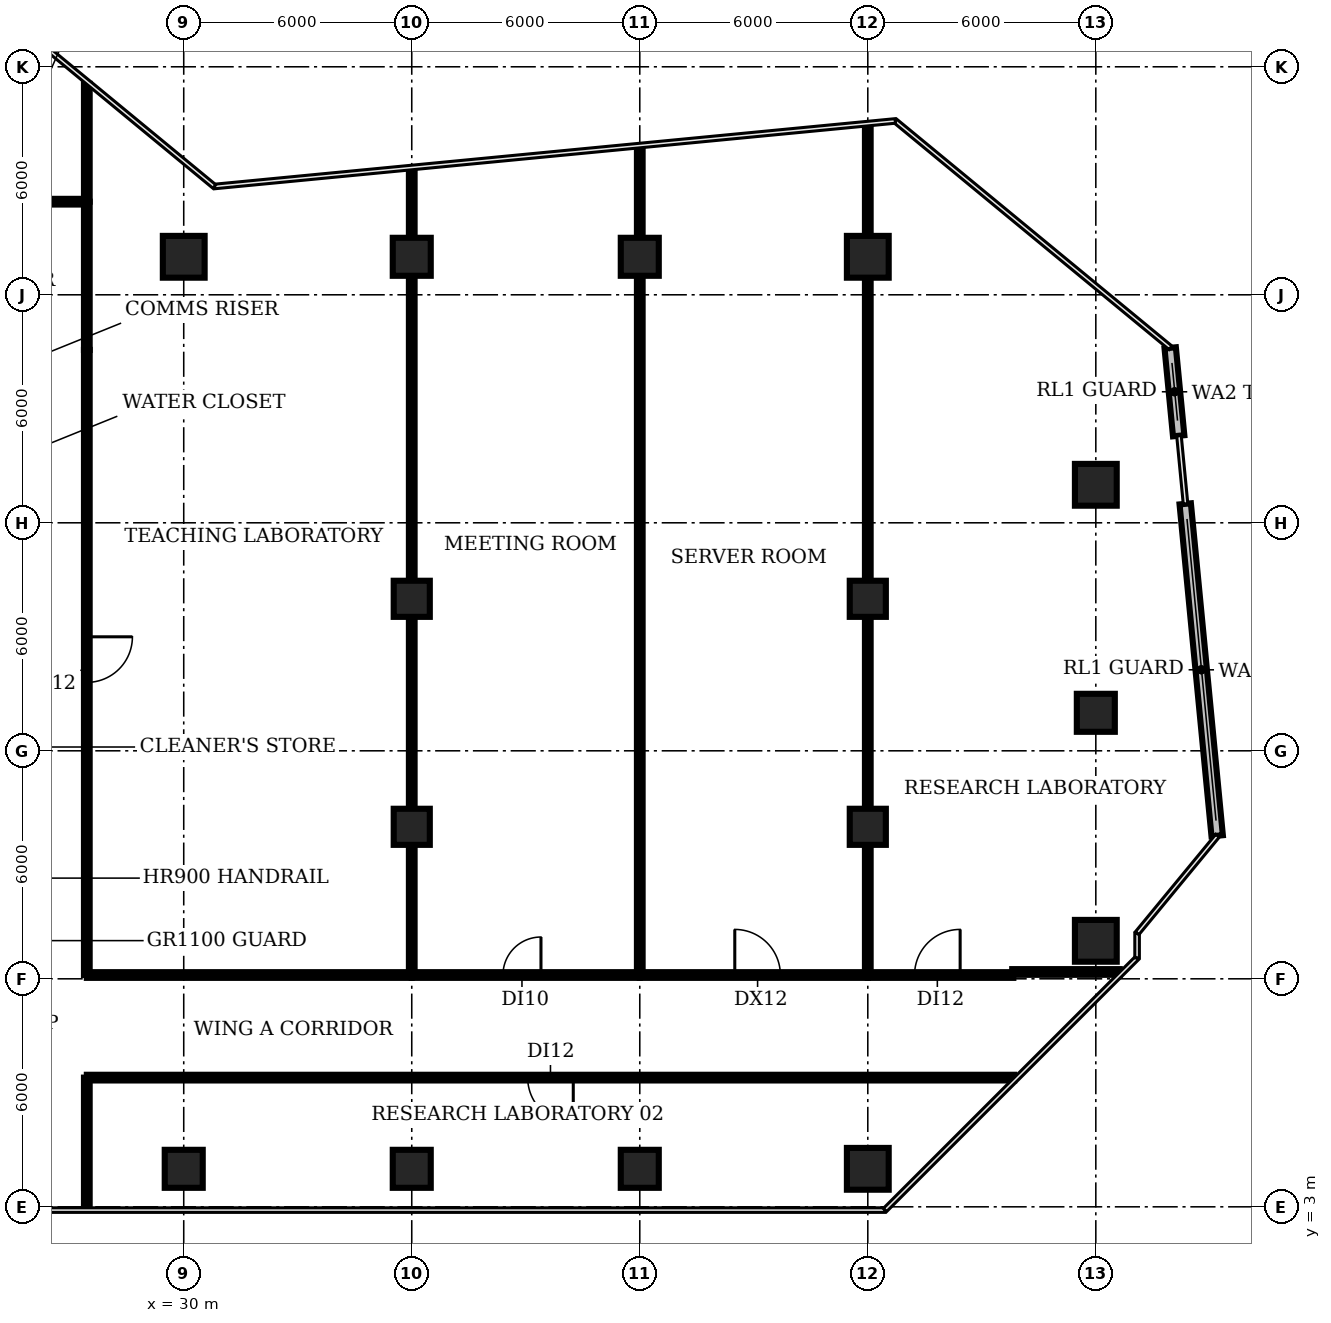
"""IFC4 building model, lengths in metres.
Left out: names, types, materials, properties, quantities, classifications, styles, units other than length and angle.
Written with IfcOpenShell. Run it as: python <this file> out.ifc"""

import sys

from ifc_helpers import new_model, si_unit, direction, frame, frame_2d, origin, origin_2d, place, context, subcontext, project, spatial, rectangle, circle, extrude, element, fill, save


model = new_model("IFC4")
c1 = context("Model", 3, precision=1e-05, world=origin(), true_north=direction((0.0, 1.0)))
c2 = subcontext(c1, "Body", "Model", "MODEL_VIEW")
j1 = project(units=[si_unit("LENGTHUNIT", "METRE"), si_unit("PLANEANGLEUNIT", "RADIAN")], contexts=[c1])
p1 = place(None, origin())
s1 = spatial("IfcSite", under=j1, at=p1, CompositionType="ELEMENT")
p2 = place(p1, origin())
s2 = spatial("IfcBuilding", under=s1, at=p2, CompositionType="ELEMENT")
p3 = place(p2, frame((0.0, 0.0, 87.8)))
s3 = spatial("IfcBuildingStorey", under=s2, at=p3, CompositionType="ELEMENT", Elevation=87.8)
p4 = place(p3, frame((30.0, 4.0, -0.35), z_axis=(0.0, 0.0, 1.0), x_axis=(1.0, 0.0, 0.0)))
e1 = element("IfcColumn", 1, at=p4, inside=s3, PredefinedType="COLUMN", context=c2, shape_type="SweptSolid", body=[
    extrude(rectangle(XDim=1.0, YDim=1.0, at=origin_2d()), origin(), (0.0, 0.0, 1.0), 4.2),
])
p5 = place(p3, frame((30.0, 28.0, -0.35), z_axis=(0.0, 0.0, 1.0), x_axis=(1.0, 0.0, 0.0)))
e2 = element("IfcColumn", 2, at=p5, inside=s3, PredefinedType="COLUMN", context=c2, shape_type="SweptSolid", body=[
    extrude(circle(Radius=0.55, at=origin_2d()), origin(), (0.0, 0.0, 1.0), 4.2),
])
p6 = place(p3, frame((36.0, 4.0, -0.35), z_axis=(0.0, 0.0, 1.0), x_axis=(1.0, 0.0, 0.0)))
e3 = element("IfcColumn", 3, at=p6, inside=s3, PredefinedType="COLUMN", context=c2, shape_type="SweptSolid", body=[
    extrude(rectangle(XDim=1.0, YDim=1.0, at=origin_2d()), origin(), (0.0, 0.0, 1.0), 4.2),
])
for number, where, z_axis, x_axis in (
    (4, (36.0, 13.0, -0.35), (0.0, 0.0, 1.0), (1.0, 0.0, 0.0)),
    (5, (36.0, 19.0, -0.35), (0.0, 0.0, 1.0), (1.0, 0.0, 0.0)),
):
    element("IfcColumn", number, at=place(p3, frame(where, z_axis=z_axis, x_axis=x_axis)), inside=s3, PredefinedType="COLUMN", context=c2, shape_type="SweptSolid", body=[
        extrude(rectangle(XDim=0.95, YDim=0.95, at=origin_2d()), origin(), (0.0, 0.0, 1.0), 4.2),
    ])
for number, where, z_axis, x_axis in (
    (6, (36.0, 28.0, -0.35), (0.0, 0.0, 1.0), (1.0, 0.0, 0.0)),
    (7, (42.0, 4.0, -0.35), (0.0, 0.0, 1.0), (1.0, 0.0, 0.0)),
    (8, (42.0, 28.0, -0.35), (0.0, 0.0, 1.0), (1.0, 0.0, 0.0)),
):
    element("IfcColumn", number, at=place(p3, frame(where, z_axis=z_axis, x_axis=x_axis)), inside=s3, PredefinedType="COLUMN", context=c2, shape_type="SweptSolid", body=[
        extrude(rectangle(XDim=1.0, YDim=1.0, at=origin_2d()), origin(), (0.0, 0.0, 1.0), 4.2),
    ])
p7 = place(p3, frame((48.0, 4.0, -0.35), z_axis=(0.0, 0.0, 1.0), x_axis=(1.0, 0.0, 0.0)))
e9 = element("IfcColumn", 9, at=p7, inside=s3, PredefinedType="COLUMN", context=c2, shape_type="SweptSolid", body=[
    extrude(circle(Radius=0.55, at=origin_2d()), origin(), (0.0, 0.0, 1.0), 4.2),
])
for number, where, z_axis, x_axis in (
    (10, (48.0, 13.0, -0.35), (0.0, 0.0, 1.0), (1.0, 0.0, 0.0)),
    (11, (48.0, 19.0, -0.35), (0.0, 0.0, 1.0), (1.0, 0.0, 0.0)),
):
    element("IfcColumn", number, at=place(p3, frame(where, z_axis=z_axis, x_axis=x_axis)), inside=s3, PredefinedType="COLUMN", context=c2, shape_type="SweptSolid", body=[
        extrude(rectangle(XDim=0.95, YDim=0.95, at=origin_2d()), origin(), (0.0, 0.0, 1.0), 4.2),
    ])
for number, where, z_axis, x_axis in (
    (12, (48.0, 28.0, -0.35), (0.0, 0.0, 1.0), (1.0, 0.0, 0.0)),
    (13, (54.0, 10.0, -0.35), (0.0, 0.0, 1.0), (1.0, 0.0, 0.0)),
):
    element("IfcColumn", number, at=place(p3, frame(where, z_axis=z_axis, x_axis=x_axis)), inside=s3, PredefinedType="COLUMN", context=c2, shape_type="SweptSolid", body=[
        extrude(circle(Radius=0.55, at=origin_2d()), origin(), (0.0, 0.0, 1.0), 4.2),
    ])
p8 = place(p3, frame((54.0, 16.0, -0.35), z_axis=(0.0, 0.0, 1.0), x_axis=(1.0, 0.0, 0.0)))
e14 = element("IfcColumn", 14, at=p8, inside=s3, PredefinedType="COLUMN", context=c2, shape_type="SweptSolid", body=[
    extrude(rectangle(XDim=1.0, YDim=1.0, at=origin_2d()), origin(), (0.0, 0.0, 1.0), 4.2),
])
p9 = place(p3, frame((54.0, 22.0, -0.35), z_axis=(0.0, 0.0, 1.0), x_axis=(1.0, 0.0, 0.0)))
e15 = element("IfcColumn", 15, at=p9, inside=s3, PredefinedType="COLUMN", context=c2, shape_type="SweptSolid", body=[
    extrude(circle(Radius=0.55, at=origin_2d()), origin(), (0.0, 0.0, 1.0), 4.2),
])
p10 = place(p3, frame((57.194, 12.764, 0.0), z_axis=(0.0, 0.0, 1.0), x_axis=(-0.095852900965, 0.995395510024, 0.0)))
e16 = element("IfcWall", 16, at=p10, inside=s3, PredefinedType="SOLIDWALL", context=c2, shape_type="SweptSolid", body=[
    extrude(rectangle(XDim=8.774, YDim=0.3, at=frame_2d((4.387, 0.0))), origin(), (0.0, 0.0, 1.0), 3.85),
])
p11 = place(p3, frame((56.18, 23.29, 0.0), z_axis=(0.0, 0.0, 1.0), x_axis=(-0.095770434057, 0.995403447834, 0.0)))
e17 = element("IfcWall", 17, at=p11, inside=s3, PredefinedType="SOLIDWALL", context=c2, shape_type="SweptSolid", body=[
    extrude(rectangle(XDim=2.325, YDim=0.3, at=frame_2d((1.163, 0.0))), origin(), (0.0, 0.0, 1.0), 3.85),
])
p12 = place(p3, frame((23.85, 29.45, 0.0), z_axis=(0.0, 0.0, 1.0), x_axis=(1.0, 0.0, 0.0)))
e18 = element("IfcWall", 18, at=p12, inside=s3, PredefinedType="PARTITIONING", context=c2, shape_type="SweptSolid", body=[
    extrude(rectangle(XDim=3.6, YDim=0.15, at=frame_2d((1.8, 0.0))), origin(), (0.0, 0.0, 1.0), 2.83),
])
p13 = place(p12, frame((1.3, 0.0, 0.0)))
e19 = element("IfcOpeningElement", 19, at=p13, cuts=e18, PredefinedType="OPENING", context=c2, shape_type="SweptSolid", body=[
    extrude(rectangle(XDim=0.9, YDim=2.1, at=frame_2d((0.45, 1.05))), frame((0.0, 0.085, 0.0), z_axis=(0.0, -1.0, 0.0), x_axis=(1.0, 0.0, 0.0)), (0.0, 0.0, 1.0), 0.17),
])
p14 = place(p3, frame((27.45, 2.96, 0.0), z_axis=(0.0, 0.0, 1.0), x_axis=(0.0, 1.0, 0.0)))
e20 = element("IfcWall", 20, at=p14, inside=s3, PredefinedType="PARTITIONING", context=c2, shape_type="SweptSolid", body=[
    extrude(rectangle(XDim=3.44, YDim=0.15, at=frame_2d((1.72, 0.0))), origin(), (0.0, 0.0, 1.0), 2.83),
])
p15 = place(p3, frame((27.45, 9.1, 0.0), z_axis=(0.0, 0.0, 1.0), x_axis=(1.0, 0.0, 0.0)))
e21 = element("IfcWall", 21, at=p15, inside=s3, PredefinedType="PARTITIONING", context=c2, shape_type="SweptSolid", body=[
    extrude(rectangle(XDim=8.55, YDim=0.15, at=frame_2d((4.275, 0.0))), origin(), (0.0, 0.0, 1.0), 2.83),
])
p16 = place(p3, frame((27.45, 25.55, 0.0), z_axis=(0.0, 0.0, 1.0), x_axis=(0.0, -1.0, 0.0)))
e22 = element("IfcWall", 22, at=p16, inside=s3, PredefinedType="PARTITIONING", context=c2, shape_type="SweptSolid", body=[
    extrude(rectangle(XDim=16.45, YDim=0.15, at=frame_2d((8.225, 0.0))), origin(), (0.0, 0.0, 1.0), 2.83),
])
p17 = place(p16, frame((7.55, 0.0, 0.0)))
e23 = element("IfcOpeningElement", 23, at=p17, cuts=e22, PredefinedType="OPENING", context=c2, shape_type="SweptSolid", body=[
    extrude(rectangle(XDim=1.2, YDim=2.1, at=frame_2d((0.6, 1.05))), frame((0.0, 0.085, 0.0), z_axis=(0.0, -1.0, 0.0), x_axis=(1.0, 0.0, 0.0)), (0.0, 0.0, 1.0), 0.17),
])
p18 = place(p3, frame((27.45, 25.55, 0.0), z_axis=(0.0, 0.0, 1.0), x_axis=(0.0, 1.0, 0.0)))
e24 = element("IfcWall", 24, at=p18, inside=s3, PredefinedType="PARTITIONING", context=c2, shape_type="SweptSolid", body=[
    extrude(rectangle(XDim=3.9, YDim=0.15, at=frame_2d((1.95, 0.0))), origin(), (0.0, 0.0, 1.0), 2.83),
])
p19 = place(p3, frame((27.45, 29.45, 0.0), z_axis=(0.0, 0.0, 1.0), x_axis=(0.0, 1.0, 0.0)))
e25 = element("IfcWall", 25, at=p19, inside=s3, PredefinedType="PARTITIONING", context=c2, shape_type="SweptSolid", body=[
    extrude(rectangle(XDim=3.1, YDim=0.15, at=frame_2d((1.55, 0.0))), origin(), (0.0, 0.0, 1.0), 2.83),
])
p20 = place(p3, frame((36.0, 9.1, 0.0), z_axis=(0.0, 0.0, 1.0), x_axis=(0.0, 1.0, 0.0)))
e26 = element("IfcWall", 26, at=p20, inside=s3, PredefinedType="PARTITIONING", context=c2, shape_type="SweptSolid", body=[
    extrude(rectangle(XDim=21.2, YDim=0.15, at=frame_2d((10.6, 0.0))), origin(), (0.0, 0.0, 1.0), 2.83),
])
p21 = place(p3, frame((36.0, 9.1, 0.0), z_axis=(0.0, 0.0, 1.0), x_axis=(1.0, 0.0, 0.0)))
e27 = element("IfcWall", 27, at=p21, inside=s3, PredefinedType="PARTITIONING", context=c2, shape_type="SweptSolid", body=[
    extrude(rectangle(XDim=6.0, YDim=0.15, at=frame_2d((3.0, 0.0))), origin(), (0.0, 0.0, 1.0), 2.83),
])
p22 = place(p21, frame((2.4, 0.0, 0.0)))
e28 = element("IfcOpeningElement", 28, at=p22, cuts=e27, PredefinedType="OPENING", context=c2, shape_type="SweptSolid", body=[
    extrude(rectangle(XDim=1.0, YDim=2.1, at=frame_2d((0.5, 1.05))), frame((0.0, 0.085, 0.0), z_axis=(0.0, -1.0, 0.0), x_axis=(1.0, 0.0, 0.0)), (0.0, 0.0, 1.0), 0.17),
])
p23 = place(p3, frame((42.0, 9.1, 0.0), z_axis=(0.0, 0.0, 1.0), x_axis=(0.0, 1.0, 0.0)))
e29 = element("IfcWall", 29, at=p23, inside=s3, PredefinedType="PARTITIONING", context=c2, shape_type="SweptSolid", body=[
    extrude(rectangle(XDim=21.78, YDim=0.15, at=frame_2d((10.89, 0.0))), origin(), (0.0, 0.0, 1.0), 2.83),
])
p24 = place(p3, frame((42.0, 9.1, 0.0), z_axis=(0.0, 0.0, 1.0), x_axis=(1.0, 0.0, 0.0)))
e30 = element("IfcWall", 30, at=p24, inside=s3, PredefinedType="PARTITIONING", context=c2, shape_type="SweptSolid", body=[
    extrude(rectangle(XDim=6.0, YDim=0.15, at=frame_2d((3.0, 0.0))), origin(), (0.0, 0.0, 1.0), 2.83),
])
p25 = place(p24, frame((2.5, 0.0, 0.0)))
e31 = element("IfcOpeningElement", 31, at=p25, cuts=e30, PredefinedType="OPENING", context=c2, shape_type="SweptSolid", body=[
    extrude(rectangle(XDim=1.2, YDim=2.1, at=frame_2d((0.6, 1.05))), frame((0.0, 0.085, 0.0), z_axis=(0.0, -1.0, 0.0), x_axis=(1.0, 0.0, 0.0)), (0.0, 0.0, 1.0), 0.17),
])
p26 = place(p3, frame((48.0, 9.1, 0.0), z_axis=(0.0, 0.0, 1.0), x_axis=(0.0, 1.0, 0.0)))
e32 = element("IfcWall", 32, at=p26, inside=s3, PredefinedType="PARTITIONING", context=c2, shape_type="SweptSolid", body=[
    extrude(rectangle(XDim=22.35, YDim=0.15, at=frame_2d((11.175, 0.0))), origin(), (0.0, 0.0, 1.0), 2.83),
])
p27 = place(p3, frame((48.0, 9.1, 0.0), z_axis=(0.0, 0.0, 1.0), x_axis=(1.0, 0.0, 0.0)))
e33 = element("IfcWall", 33, at=p27, inside=s3, PredefinedType="PARTITIONING", context=c2, shape_type="SweptSolid", body=[
    extrude(rectangle(XDim=3.83, YDim=0.15, at=frame_2d((1.915, 0.0))), origin(), (0.0, 0.0, 1.0), 2.83),
])
p28 = place(p27, frame((1.23, 0.0, 0.0)))
e34 = element("IfcOpeningElement", 34, at=p28, cuts=e33, PredefinedType="OPENING", context=c2, shape_type="SweptSolid", body=[
    extrude(rectangle(XDim=1.2, YDim=2.1, at=frame_2d((0.6, 1.05))), frame((0.0, 0.085, 0.0), z_axis=(0.0, -1.0, 0.0), x_axis=(1.0, 0.0, 0.0)), (0.0, 0.0, 1.0), 0.17),
])
p29 = place(p3, frame((51.8, 9.18, 0.0), z_axis=(0.0, 0.0, 1.0), x_axis=(1.0, 0.0, 0.0)))
e35 = element("IfcWall", 35, at=p29, inside=s3, PredefinedType="PARTITIONING", context=c2, shape_type="SweptSolid", body=[
    extrude(rectangle(XDim=2.831, YDim=0.15, at=frame_2d((1.416, 0.0))), origin(), (0.0, 0.0, 1.0), 2.83),
])
p30 = place(p3, frame((51.851, 6.4, 0.0), z_axis=(0.0, 0.0, 1.0), x_axis=(-1.0, 0.0, 0.0)))
e36 = element("IfcWall", 36, at=p30, inside=s3, PredefinedType="PARTITIONING", context=c2, shape_type="SweptSolid", body=[
    extrude(rectangle(XDim=24.401, YDim=0.15, at=frame_2d((12.201, 0.0))), origin(), (0.0, 0.0, 1.0), 2.83),
])
p31 = place(p30, frame((11.601, 0.0, 0.0)))
e37 = element("IfcOpeningElement", 37, at=p31, cuts=e36, PredefinedType="OPENING", context=c2, shape_type="SweptSolid", body=[
    extrude(rectangle(XDim=1.2, YDim=2.1, at=frame_2d((0.6, 1.05))), frame((0.0, 0.085, 0.0), z_axis=(0.0, -1.0, 0.0), x_axis=(1.0, 0.0, 0.0)), (0.0, 0.0, 1.0), 0.17),
])
p32 = place(p17, origin())
e38 = element("IfcDoor", 38, at=p32, inside=s3, OperationType="SINGLE_SWING_LEFT", PredefinedType="DOOR", context=c2, shape_type="SweptSolid", body=[
    extrude(rectangle(XDim=1.2, YDim=2.1, at=frame_2d((0.6, 1.05))), frame((0.0, 0.025, 0.0), z_axis=(0.0, -1.0, 0.0), x_axis=(1.0, 0.0, 0.0)), (0.0, 0.0, 1.0), 0.05),
])
fill(e23, e38)
p33 = place(p22, origin())
e39 = element("IfcDoor", 39, at=p33, inside=s3, OperationType="SINGLE_SWING_RIGHT", PredefinedType="DOOR", context=c2, shape_type="SweptSolid", body=[
    extrude(rectangle(XDim=1.0, YDim=2.1, at=frame_2d((0.5, 1.05))), frame((0.0, 0.025, 0.0), z_axis=(0.0, -1.0, 0.0), x_axis=(1.0, 0.0, 0.0)), (0.0, 0.0, 1.0), 0.05),
])
fill(e28, e39)
p34 = place(p25, origin())
e40 = element("IfcDoor", 40, at=p34, inside=s3, OperationType="SINGLE_SWING_LEFT", PredefinedType="DOOR", context=c2, shape_type="SweptSolid", body=[
    extrude(rectangle(XDim=1.2, YDim=2.1, at=frame_2d((0.6, 1.05))), frame((0.0, 0.025, 0.0), z_axis=(0.0, -1.0, 0.0), x_axis=(1.0, 0.0, 0.0)), (0.0, 0.0, 1.0), 0.05),
])
fill(e31, e40)
p35 = place(p28, origin())
e41 = element("IfcDoor", 41, at=p35, inside=s3, OperationType="SINGLE_SWING_RIGHT", PredefinedType="DOOR", context=c2, shape_type="SweptSolid", body=[
    extrude(rectangle(XDim=1.2, YDim=2.1, at=frame_2d((0.6, 1.05))), frame((0.0, 0.025, 0.0), z_axis=(0.0, -1.0, 0.0), x_axis=(1.0, 0.0, 0.0)), (0.0, 0.0, 1.0), 0.05),
])
fill(e34, e41)
p36 = place(p31, origin())
e42 = element("IfcDoor", 42, at=p36, inside=s3, OperationType="SINGLE_SWING_LEFT", PredefinedType="DOOR", context=c2, shape_type="SweptSolid", body=[
    extrude(rectangle(XDim=1.2, YDim=2.1, at=frame_2d((0.6, 1.05))), frame((0.0, 0.025, 0.0), z_axis=(0.0, -1.0, 0.0), x_axis=(1.0, 0.0, 0.0)), (0.0, 0.0, 1.0), 0.05),
])
fill(e37, e42)
save(model, sys.argv[1])
